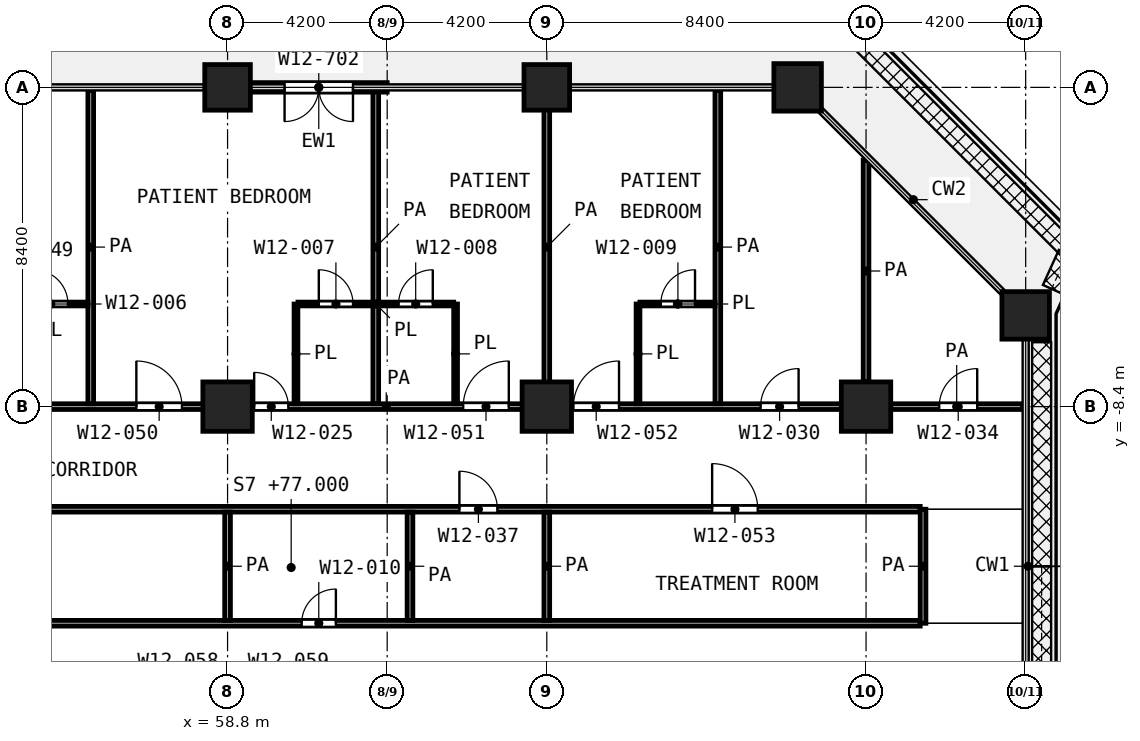
"""IFC4 building model, lengths in metres.
Left out: names, types, materials, properties, quantities, classifications, styles, units other than length and angle.
Written with IfcOpenShell. Run it as: python <this file> out.ifc"""

import sys

from ifc_helpers import new_model, si_unit, direction, frame, frame_2d, origin, origin_2d, place, context, subcontext, project, spatial, rectangle, extrude, element, fill, save


model = new_model("IFC4")
c1 = context("Model", 3, precision=1e-05, world=origin(), true_north=direction((0.0, 1.0)))
c2 = subcontext(c1, "Body", "Model", "MODEL_VIEW")
j1 = project(units=[si_unit("LENGTHUNIT", "METRE"), si_unit("PLANEANGLEUNIT", "RADIAN")], contexts=[c1])
p1 = place(None, origin())
s1 = spatial("IfcSite", under=j1, at=p1, CompositionType="ELEMENT")
p2 = place(p1, origin())
s2 = spatial("IfcBuilding", under=s1, at=p2, CompositionType="ELEMENT")
p3 = place(p2, frame((0.0, 0.0, 77.0)))
s3 = spatial("IfcBuildingStorey", under=s2, at=p3, CompositionType="ELEMENT", Elevation=77.0)
for number, where, z_axis, x_axis in (
    (1, (58.8, 0.0, 0.0), (0.0, 0.0, 1.0), (1.0, 0.0, 0.0)),
    (2, (67.2, 0.0, 0.0), (0.0, 0.0, 1.0), (1.0, 0.0, 0.0)),
):
    element("IfcColumn", number, at=place(p3, frame(where, z_axis=z_axis, x_axis=x_axis)), inside=s3, PredefinedType="COLUMN", context=c2, shape_type="SweptSolid", body=[
        extrude(rectangle(XDim=1.2, YDim=1.2, at=origin_2d()), origin(), (0.0, 0.0, 1.0), 4.2),
    ])
for number, where, z_axis, x_axis in (
    (3, (73.8, 0.0, 0.0), (0.0, 0.0, 1.0), (1.0, 0.0, 0.0)),
    (4, (79.8, -6.0, 0.0), (0.0, 0.0, 1.0), (1.0, 0.0, 0.0)),
):
    element("IfcColumn", number, at=place(p3, frame(where, z_axis=z_axis, x_axis=x_axis)), inside=s3, PredefinedType="COLUMN", context=c2, shape_type="SweptSolid", body=[
        extrude(rectangle(XDim=1.25, YDim=1.25, at=origin_2d()), origin(), (0.0, 0.0, 1.0), 4.2),
    ])
for number, where, z_axis, x_axis in (
    (5, (58.8, -8.4, 0.0), (0.0, 0.0, 1.0), (1.0, 0.0, 0.0)),
    (6, (67.2, -8.4, 0.0), (0.0, 0.0, 1.0), (1.0, 0.0, 0.0)),
    (7, (75.6, -8.4, 0.0), (0.0, 0.0, 1.0), (1.0, 0.0, 0.0)),
):
    element("IfcColumn", number, at=place(p3, frame(where, z_axis=z_axis, x_axis=x_axis)), inside=s3, PredefinedType="COLUMN", context=c2, shape_type="SweptSolid", body=[
        extrude(rectangle(XDim=1.3, YDim=1.3, at=origin_2d()), origin(), (0.0, 0.0, 1.0), 4.2),
    ])
p4 = place(p3, frame((63.0, 0.0, 0.0), z_axis=(0.0, 0.0, 1.0), x_axis=(-1.0, 0.0, 0.0)))
e8 = element("IfcWall", 8, at=p4, inside=s3, PredefinedType="SOLIDWALL", context=c2, shape_type="SweptSolid", body=[
    extrude(rectangle(XDim=3.6, YDim=0.25, at=frame_2d((1.8, 0.0))), origin(), (0.0, 0.0, 1.0), 3.78),
])
p5 = place(p4, frame((0.9, 0.0, 0.0)))
e9 = element("IfcOpeningElement", 9, at=p5, cuts=e8, PredefinedType="OPENING", context=c2, shape_type="SweptSolid", body=[
    extrude(rectangle(XDim=1.8, YDim=2.1, at=frame_2d((0.9, 1.05))), frame((0.0, 0.135, 0.0), z_axis=(0.0, -1.0, 0.0), x_axis=(1.0, 0.0, 0.0)), (0.0, 0.0, 1.0), 0.27),
])
p6 = place(p3, frame((53.15, -5.7, 0.0), z_axis=(0.0, 0.0, 1.0), x_axis=(1.0, 0.0, 0.0)))
e10 = element("IfcWall", 10, at=p6, inside=s3, PredefinedType="PARTITIONING", context=c2, shape_type="SweptSolid", body=[
    extrude(rectangle(XDim=1.975, YDim=0.1, at=frame_2d((0.988, 0.0))), origin(), (0.0, 0.0, 1.0), 3.9),
])
p7 = place(p6, frame((0.55, 0.0, 0.0)))
e11 = element("IfcOpeningElement", 11, at=p7, cuts=e10, PredefinedType="OPENING", context=c2, shape_type="SweptSolid", body=[
    extrude(rectangle(XDim=0.9, YDim=2.1, at=frame_2d((0.45, 1.05))), frame((0.0, 0.06, 0.0), z_axis=(0.0, -1.0, 0.0), x_axis=(1.0, 0.0, 0.0)), (0.0, 0.0, 1.0), 0.12),
])
p8 = place(p3, frame((60.652, -5.7, 0.0), z_axis=(0.0, 0.0, 1.0), x_axis=(1.0, 0.0, 0.0)))
e12 = element("IfcWall", 12, at=p8, inside=s3, PredefinedType="PARTITIONING", context=c2, shape_type="SweptSolid", body=[
    extrude(rectangle(XDim=4.098, YDim=0.1, at=frame_2d((2.049, 0.0))), origin(), (0.0, 0.0, 1.0), 3.9),
])
p9 = place(p8, frame((0.549, 0.0, 0.0)))
e13 = element("IfcOpeningElement", 13, at=p9, cuts=e12, PredefinedType="OPENING", context=c2, shape_type="SweptSolid", body=[
    extrude(rectangle(XDim=0.9, YDim=2.1, at=frame_2d((0.45, 1.05))), frame((0.0, 0.06, 0.0), z_axis=(0.0, -1.0, 0.0), x_axis=(1.0, 0.0, 0.0)), (0.0, 0.0, 1.0), 0.12),
])
p10 = place(p8, frame((2.648, 0.0, 0.0)))
e14 = element("IfcOpeningElement", 14, at=p10, cuts=e12, PredefinedType="OPENING", context=c2, shape_type="SweptSolid", body=[
    extrude(rectangle(XDim=0.9, YDim=2.1, at=frame_2d((0.45, 1.05))), frame((0.0, 0.06, 0.0), z_axis=(0.0, -1.0, 0.0), x_axis=(1.0, 0.0, 0.0)), (0.0, 0.0, 1.0), 0.12),
])
p11 = place(p3, frame((69.65, -5.7, 0.0), z_axis=(0.0, 0.0, 1.0), x_axis=(1.0, 0.0, 0.0)))
e15 = element("IfcWall", 15, at=p11, inside=s3, PredefinedType="PARTITIONING", context=c2, shape_type="SweptSolid", body=[
    extrude(rectangle(XDim=1.975, YDim=0.1, at=frame_2d((0.988, 0.0))), origin(), (0.0, 0.0, 1.0), 3.9),
])
p12 = place(p11, frame((0.55, 0.0, 0.0)))
e16 = element("IfcOpeningElement", 16, at=p12, cuts=e15, PredefinedType="OPENING", context=c2, shape_type="SweptSolid", body=[
    extrude(rectangle(XDim=0.9, YDim=2.1, at=frame_2d((0.45, 1.05))), frame((0.0, 0.06, 0.0), z_axis=(0.0, -1.0, 0.0), x_axis=(1.0, 0.0, 0.0)), (0.0, 0.0, 1.0), 0.12),
])
p13 = place(p3, frame((60.6, -8.325, 0.0), z_axis=(0.0, 0.0, 1.0), x_axis=(0.0, 1.0, 0.0)))
e17 = element("IfcWall", 17, at=p13, inside=s3, PredefinedType="PARTITIONING", context=c2, shape_type="SweptSolid", body=[
    extrude(rectangle(XDim=2.624, YDim=0.1, at=frame_2d((1.312, 0.0))), origin(), (0.0, 0.0, 1.0), 3.9),
])
for number, where, z_axis, x_axis in (
    (18, (64.8, -8.325, 0.0), (0.0, 0.0, 1.0), (0.0, 1.0, 0.0)),
    (19, (69.6, -8.325, 0.0), (0.0, 0.0, 1.0), (0.0, 1.0, 0.0)),
):
    element("IfcWall", number, at=place(p3, frame(where, z_axis=z_axis, x_axis=x_axis)), inside=s3, PredefinedType="PARTITIONING", context=c2, shape_type="SweptSolid", body=[
        extrude(rectangle(XDim=2.625, YDim=0.1, at=frame_2d((1.312, 0.0))), origin(), (0.0, 0.0, 1.0), 3.9),
    ])
p14 = place(p3, frame((29.475, -14.1, 0.0), z_axis=(0.0, 0.0, 1.0), x_axis=(1.0, 0.0, 0.0)))
e20 = element("IfcWall", 20, at=p14, inside=s3, PredefinedType="PARTITIONING", context=c2, shape_type="SweptSolid", body=[
    extrude(rectangle(XDim=47.55, YDim=0.15, at=frame_2d((23.775, 0.0))), origin(), (0.0, 0.0, 1.0), 3.9),
])
p15 = place(p14, frame((7.525, 0.0, 0.0)))
e21 = element("IfcOpeningElement", 21, at=p15, cuts=e20, PredefinedType="OPENING", context=c2, shape_type="SweptSolid", body=[
    extrude(rectangle(XDim=1.0, YDim=2.1, at=frame_2d((0.5, 1.05))), frame((0.0, 0.085, 0.0), z_axis=(0.0, -1.0, 0.0), x_axis=(1.0, 0.0, 0.0)), (0.0, 0.0, 1.0), 0.17),
])
p16 = place(p14, frame((22.225, 0.0, 0.0)))
e22 = element("IfcOpeningElement", 22, at=p16, cuts=e20, PredefinedType="OPENING", context=c2, shape_type="SweptSolid", body=[
    extrude(rectangle(XDim=1.0, YDim=2.1, at=frame_2d((0.5, 1.05))), frame((0.0, 0.085, 0.0), z_axis=(0.0, -1.0, 0.0), x_axis=(1.0, 0.0, 0.0)), (0.0, 0.0, 1.0), 0.17),
])
p17 = place(p14, frame((31.275, 0.0, 0.0)))
e23 = element("IfcOpeningElement", 23, at=p17, cuts=e20, PredefinedType="OPENING", context=c2, shape_type="SweptSolid", body=[
    extrude(rectangle(XDim=0.9, YDim=2.1, at=frame_2d((0.45, 1.05))), frame((0.0, 0.085, 0.0), z_axis=(0.0, -1.0, 0.0), x_axis=(1.0, 0.0, 0.0)), (0.0, 0.0, 1.0), 0.17),
])
p18 = place(p3, frame((29.475, -11.1, 0.0), z_axis=(0.0, 0.0, 1.0), x_axis=(1.0, 0.0, 0.0)))
e24 = element("IfcWall", 24, at=p18, inside=s3, PredefinedType="PARTITIONING", context=c2, shape_type="SweptSolid", body=[
    extrude(rectangle(XDim=47.55, YDim=0.15, at=frame_2d((23.775, 0.0))), origin(), (0.0, 0.0, 1.0), 3.9),
])
p19 = place(p18, frame((35.425, 0.0, 0.0)))
e25 = element("IfcOpeningElement", 25, at=p19, cuts=e24, PredefinedType="OPENING", context=c2, shape_type="SweptSolid", body=[
    extrude(rectangle(XDim=1.0, YDim=2.1, at=frame_2d((0.5, 1.05))), frame((0.0, 0.085, 0.0), z_axis=(0.0, -1.0, 0.0), x_axis=(1.0, 0.0, 0.0)), (0.0, 0.0, 1.0), 0.17),
])
p20 = place(p18, frame((42.075, 0.0, 0.0)))
e26 = element("IfcOpeningElement", 26, at=p20, cuts=e24, PredefinedType="OPENING", context=c2, shape_type="SweptSolid", body=[
    extrude(rectangle(XDim=1.2, YDim=2.1, at=frame_2d((0.6, 1.05))), frame((0.0, 0.085, 0.0), z_axis=(0.0, -1.0, 0.0), x_axis=(1.0, 0.0, 0.0)), (0.0, 0.0, 1.0), 0.17),
])
p21 = place(p3, frame((51.0, -8.4, 0.0), z_axis=(0.0, 0.0, 1.0), x_axis=(1.0, 0.0, 0.0)))
e27 = element("IfcWall", 27, at=p21, inside=s3, PredefinedType="PARTITIONING", context=c2, shape_type="SweptSolid", body=[
    extrude(rectangle(XDim=23.95, YDim=0.15, at=frame_2d((11.975, 0.0))), origin(), (0.0, 0.0, 1.0), 3.9),
])
p22 = place(p21, frame((5.4, 0.0, 0.0)))
e28 = element("IfcOpeningElement", 28, at=p22, cuts=e27, PredefinedType="OPENING", context=c2, shape_type="SweptSolid", body=[
    extrude(rectangle(XDim=1.2, YDim=2.1, at=frame_2d((0.6, 1.05))), frame((0.0, 0.085, 0.0), z_axis=(0.0, -1.0, 0.0), x_axis=(1.0, 0.0, 0.0)), (0.0, 0.0, 1.0), 0.17),
])
p23 = place(p21, frame((8.5, 0.0, 0.0)))
e29 = element("IfcOpeningElement", 29, at=p23, cuts=e27, PredefinedType="OPENING", context=c2, shape_type="SweptSolid", body=[
    extrude(rectangle(XDim=0.9, YDim=2.1, at=frame_2d((0.45, 1.05))), frame((0.0, 0.085, 0.0), z_axis=(0.0, -1.0, 0.0), x_axis=(1.0, 0.0, 0.0)), (0.0, 0.0, 1.0), 0.17),
])
p24 = place(p21, frame((14.0, 0.0, 0.0)))
e30 = element("IfcOpeningElement", 30, at=p24, cuts=e27, PredefinedType="OPENING", context=c2, shape_type="SweptSolid", body=[
    extrude(rectangle(XDim=1.2, YDim=2.1, at=frame_2d((0.6, 1.05))), frame((0.0, 0.085, 0.0), z_axis=(0.0, -1.0, 0.0), x_axis=(1.0, 0.0, 0.0)), (0.0, 0.0, 1.0), 0.17),
])
p25 = place(p21, frame((16.9, 0.0, 0.0)))
e31 = element("IfcOpeningElement", 31, at=p25, cuts=e27, PredefinedType="OPENING", context=c2, shape_type="SweptSolid", body=[
    extrude(rectangle(XDim=1.2, YDim=2.1, at=frame_2d((0.6, 1.05))), frame((0.0, 0.085, 0.0), z_axis=(0.0, -1.0, 0.0), x_axis=(1.0, 0.0, 0.0)), (0.0, 0.0, 1.0), 0.17),
])
p26 = place(p21, frame((21.825, 0.0, 0.0)))
e32 = element("IfcOpeningElement", 32, at=p26, cuts=e27, PredefinedType="OPENING", context=c2, shape_type="SweptSolid", body=[
    extrude(rectangle(XDim=1.0, YDim=2.1, at=frame_2d((0.5, 1.05))), frame((0.0, 0.085, 0.0), z_axis=(0.0, -1.0, 0.0), x_axis=(1.0, 0.0, 0.0)), (0.0, 0.0, 1.0), 0.17),
])
p27 = place(p3, frame((76.25, -8.4, 0.0), z_axis=(0.0, 0.0, 1.0), x_axis=(1.0, 0.0, 0.0)))
e33 = element("IfcWall", 33, at=p27, inside=s3, PredefinedType="PARTITIONING", context=c2, shape_type="SweptSolid", body=[
    extrude(rectangle(XDim=3.47, YDim=0.15, at=frame_2d((1.735, 0.0))), origin(), (0.0, 0.0, 1.0), 3.9),
])
p28 = place(p27, frame((1.275, 0.0, 0.0)))
e34 = element("IfcOpeningElement", 34, at=p28, cuts=e33, PredefinedType="OPENING", context=c2, shape_type="SweptSolid", body=[
    extrude(rectangle(XDim=1.0, YDim=2.1, at=frame_2d((0.5, 1.05))), frame((0.0, 0.085, 0.0), z_axis=(0.0, -1.0, 0.0), x_axis=(1.0, 0.0, 0.0)), (0.0, 0.0, 1.0), 0.17),
])
p29 = place(p3, frame((55.2, -8.325, 0.0), z_axis=(0.0, 0.0, 1.0), x_axis=(0.0, 1.0, 0.0)))
e35 = element("IfcWall", 35, at=p29, inside=s3, PredefinedType="PARTITIONING", context=c2, shape_type="SweptSolid", body=[
    extrude(rectangle(XDim=8.245, YDim=0.15, at=frame_2d((4.123, 0.0))), origin(), (0.0, 0.0, 1.0), 3.9),
])
p30 = place(p3, frame((58.8, -14.025, 0.0), z_axis=(0.0, 0.0, 1.0), x_axis=(0.0, 1.0, 0.0)))
e36 = element("IfcWall", 36, at=p30, inside=s3, PredefinedType="PARTITIONING", context=c2, shape_type="SweptSolid", body=[
    extrude(rectangle(XDim=2.85, YDim=0.15, at=frame_2d((1.425, 0.0))), origin(), (0.0, 0.0, 1.0), 3.9),
])
p31 = place(p3, frame((62.7, -8.325, 0.0), z_axis=(0.0, 0.0, 1.0), x_axis=(0.0, 1.0, 0.0)))
e37 = element("IfcWall", 37, at=p31, inside=s3, PredefinedType="PARTITIONING", context=c2, shape_type="SweptSolid", body=[
    extrude(rectangle(XDim=8.245, YDim=0.15, at=frame_2d((4.123, 0.0))), origin(), (0.0, 0.0, 1.0), 3.9),
])
for number, where, z_axis, x_axis in (
    (38, (63.6, -14.025, 0.0), (0.0, 0.0, 1.0), (0.0, 1.0, 0.0)),
    (39, (67.2, -14.025, 0.0), (0.0, 0.0, 1.0), (0.0, 1.0, 0.0)),
):
    element("IfcWall", number, at=place(p3, frame(where, z_axis=z_axis, x_axis=x_axis)), inside=s3, PredefinedType="PARTITIONING", context=c2, shape_type="SweptSolid", body=[
        extrude(rectangle(XDim=2.85, YDim=0.15, at=frame_2d((1.425, 0.0))), origin(), (0.0, 0.0, 1.0), 3.9),
    ])
for number, where, z_axis, x_axis in (
    (40, (67.2, -8.325, 0.0), (0.0, 0.0, 1.0), (0.0, 1.0, 0.0)),
    (41, (71.7, -8.325, 0.0), (0.0, 0.0, 1.0), (0.0, 1.0, 0.0)),
):
    element("IfcWall", number, at=place(p3, frame(where, z_axis=z_axis, x_axis=x_axis)), inside=s3, PredefinedType="PARTITIONING", context=c2, shape_type="SweptSolid", body=[
        extrude(rectangle(XDim=8.245, YDim=0.15, at=frame_2d((4.123, 0.0))), origin(), (0.0, 0.0, 1.0), 3.9),
    ])
p32 = place(p3, frame((75.6, -7.75, 0.0), z_axis=(0.0, 0.0, 1.0), x_axis=(0.0, 1.0, 0.0)))
e42 = element("IfcWall", 42, at=p32, inside=s3, PredefinedType="PARTITIONING", context=c2, shape_type="SweptSolid", body=[
    extrude(rectangle(XDim=5.837, YDim=0.15, at=frame_2d((2.918, 0.0))), origin(), (0.0, 0.0, 1.0), 3.9),
])
p33 = place(p3, frame((77.1, -14.1, 0.0), z_axis=(0.0, 0.0, 1.0), x_axis=(0.0, 1.0, 0.0)))
e43 = element("IfcWall", 43, at=p33, inside=s3, PredefinedType="PARTITIONING", context=c2, shape_type="SweptSolid", body=[
    extrude(rectangle(XDim=3.0, YDim=0.15, at=frame_2d((1.5, 0.0))), origin(), (0.0, 0.0, 1.0), 3.9),
])
p34 = place(p5, origin())
e44 = element("IfcDoor", 44, at=p34, inside=s3, OperationType="DOUBLE_DOOR_SINGLE_SWING", PredefinedType="DOOR", context=c2, shape_type="SweptSolid", body=[
    extrude(rectangle(XDim=1.8, YDim=2.1, at=frame_2d((0.9, 1.05))), frame((0.0, 0.025, 0.0), z_axis=(0.0, -1.0, 0.0), x_axis=(1.0, 0.0, 0.0)), (0.0, 0.0, 1.0), 0.05),
])
fill(e9, e44)
p35 = place(p7, origin())
e45 = element("IfcDoor", 45, at=p35, inside=s3, OperationType="SINGLE_SWING_LEFT", PredefinedType="DOOR", context=c2, shape_type="SweptSolid", body=[
    extrude(rectangle(XDim=0.9, YDim=2.1, at=frame_2d((0.45, 1.05))), frame((0.0, 0.025, 0.0), z_axis=(0.0, -1.0, 0.0), x_axis=(1.0, 0.0, 0.0)), (0.0, 0.0, 1.0), 0.05),
])
fill(e11, e45)
p36 = place(p22, origin())
e46 = element("IfcDoor", 46, at=p36, inside=s3, OperationType="SINGLE_SWING_LEFT", PredefinedType="DOOR", context=c2, shape_type="SweptSolid", body=[
    extrude(rectangle(XDim=1.2, YDim=2.1, at=frame_2d((0.6, 1.05))), frame((0.0, 0.025, 0.0), z_axis=(0.0, -1.0, 0.0), x_axis=(1.0, 0.0, 0.0)), (0.0, 0.0, 1.0), 0.05),
])
fill(e28, e46)
p37 = place(p23, origin())
e47 = element("IfcDoor", 47, at=p37, inside=s3, OperationType="SINGLE_SWING_LEFT", PredefinedType="DOOR", context=c2, shape_type="SweptSolid", body=[
    extrude(rectangle(XDim=0.9, YDim=2.1, at=frame_2d((0.45, 1.05))), frame((0.0, 0.025, 0.0), z_axis=(0.0, -1.0, 0.0), x_axis=(1.0, 0.0, 0.0)), (0.0, 0.0, 1.0), 0.05),
])
fill(e29, e47)
p38 = place(p9, origin())
e48 = element("IfcDoor", 48, at=p38, inside=s3, OperationType="SINGLE_SWING_LEFT", PredefinedType="DOOR", context=c2, shape_type="SweptSolid", body=[
    extrude(rectangle(XDim=0.9, YDim=2.1, at=frame_2d((0.45, 1.05))), frame((0.0, 0.025, 0.0), z_axis=(0.0, -1.0, 0.0), x_axis=(1.0, 0.0, 0.0)), (0.0, 0.0, 1.0), 0.05),
])
fill(e13, e48)
p39 = place(p24, origin())
e49 = element("IfcDoor", 49, at=p39, inside=s3, OperationType="SINGLE_SWING_RIGHT", PredefinedType="DOOR", context=c2, shape_type="SweptSolid", body=[
    extrude(rectangle(XDim=1.2, YDim=2.1, at=frame_2d((0.6, 1.05))), frame((0.0, 0.025, 0.0), z_axis=(0.0, -1.0, 0.0), x_axis=(1.0, 0.0, 0.0)), (0.0, 0.0, 1.0), 0.05),
])
fill(e30, e49)
p40 = place(p10, origin())
e50 = element("IfcDoor", 50, at=p40, inside=s3, OperationType="SINGLE_SWING_RIGHT", PredefinedType="DOOR", context=c2, shape_type="SweptSolid", body=[
    extrude(rectangle(XDim=0.9, YDim=2.1, at=frame_2d((0.45, 1.05))), frame((0.0, 0.025, 0.0), z_axis=(0.0, -1.0, 0.0), x_axis=(1.0, 0.0, 0.0)), (0.0, 0.0, 1.0), 0.05),
])
fill(e14, e50)
p41 = place(p25, origin())
e51 = element("IfcDoor", 51, at=p41, inside=s3, OperationType="SINGLE_SWING_RIGHT", PredefinedType="DOOR", context=c2, shape_type="SweptSolid", body=[
    extrude(rectangle(XDim=1.2, YDim=2.1, at=frame_2d((0.6, 1.05))), frame((0.0, 0.025, 0.0), z_axis=(0.0, -1.0, 0.0), x_axis=(1.0, 0.0, 0.0)), (0.0, 0.0, 1.0), 0.05),
])
fill(e31, e51)
p42 = place(p12, origin())
e52 = element("IfcDoor", 52, at=p42, inside=s3, OperationType="SINGLE_SWING_RIGHT", PredefinedType="DOOR", context=c2, shape_type="SweptSolid", body=[
    extrude(rectangle(XDim=0.9, YDim=2.1, at=frame_2d((0.45, 1.05))), frame((0.0, 0.025, 0.0), z_axis=(0.0, -1.0, 0.0), x_axis=(1.0, 0.0, 0.0)), (0.0, 0.0, 1.0), 0.05),
])
fill(e16, e52)
p43 = place(p26, origin())
e53 = element("IfcDoor", 53, at=p43, inside=s3, OperationType="SINGLE_SWING_RIGHT", PredefinedType="DOOR", context=c2, shape_type="SweptSolid", body=[
    extrude(rectangle(XDim=1.0, YDim=2.1, at=frame_2d((0.5, 1.05))), frame((0.0, 0.025, 0.0), z_axis=(0.0, -1.0, 0.0), x_axis=(1.0, 0.0, 0.0)), (0.0, 0.0, 1.0), 0.05),
])
fill(e32, e53)
p44 = place(p28, origin())
e54 = element("IfcDoor", 54, at=p44, inside=s3, OperationType="SINGLE_SWING_RIGHT", PredefinedType="DOOR", context=c2, shape_type="SweptSolid", body=[
    extrude(rectangle(XDim=1.0, YDim=2.1, at=frame_2d((0.5, 1.05))), frame((0.0, 0.025, 0.0), z_axis=(0.0, -1.0, 0.0), x_axis=(1.0, 0.0, 0.0)), (0.0, 0.0, 1.0), 0.05),
])
fill(e34, e54)
p45 = place(p17, origin())
e55 = element("IfcDoor", 55, at=p45, inside=s3, OperationType="SINGLE_SWING_RIGHT", PredefinedType="DOOR", context=c2, shape_type="SweptSolid", body=[
    extrude(rectangle(XDim=0.9, YDim=2.1, at=frame_2d((0.45, 1.05))), frame((0.0, 0.025, 0.0), z_axis=(0.0, -1.0, 0.0), x_axis=(1.0, 0.0, 0.0)), (0.0, 0.0, 1.0), 0.05),
])
fill(e23, e55)
p46 = place(p19, origin())
e56 = element("IfcDoor", 56, at=p46, inside=s3, OperationType="SINGLE_SWING_LEFT", PredefinedType="DOOR", context=c2, shape_type="SweptSolid", body=[
    extrude(rectangle(XDim=1.0, YDim=2.1, at=frame_2d((0.5, 1.05))), frame((0.0, 0.025, 0.0), z_axis=(0.0, -1.0, 0.0), x_axis=(1.0, 0.0, 0.0)), (0.0, 0.0, 1.0), 0.05),
])
fill(e25, e56)
p47 = place(p20, origin())
e57 = element("IfcDoor", 57, at=p47, inside=s3, OperationType="SINGLE_SWING_LEFT", PredefinedType="DOOR", context=c2, shape_type="SweptSolid", body=[
    extrude(rectangle(XDim=1.2, YDim=2.1, at=frame_2d((0.6, 1.05))), frame((0.0, 0.025, 0.0), z_axis=(0.0, -1.0, 0.0), x_axis=(1.0, 0.0, 0.0)), (0.0, 0.0, 1.0), 0.05),
])
fill(e26, e57)
save(model, sys.argv[1])
